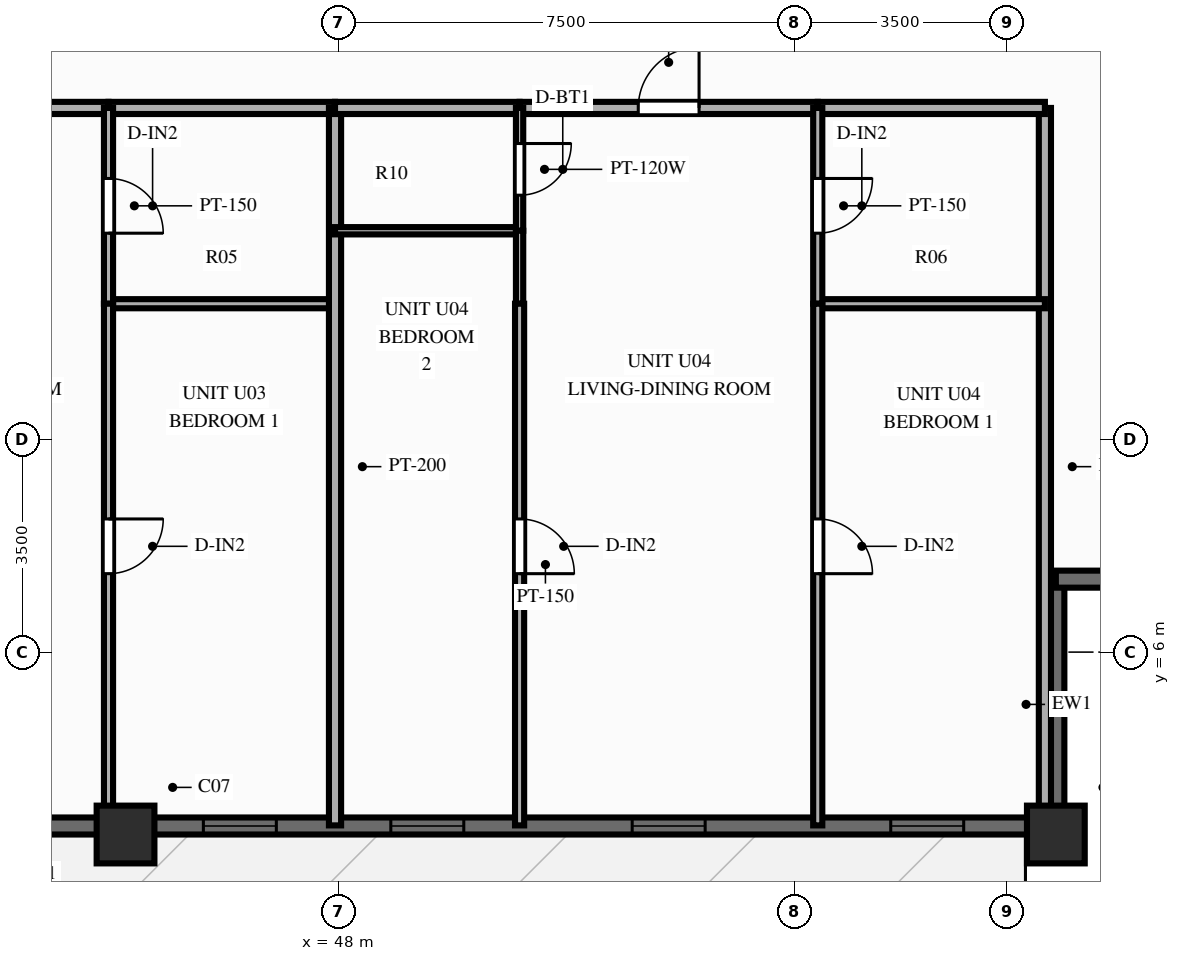
"""IFC4 building model, lengths in metres.
Left out: names, types, materials, properties, quantities, classifications, styles, units other than length and angle.
Written with IfcOpenShell. Run it as: python <this file> out.ifc"""

import sys

from ifc_helpers import new_model, si_unit, direction, frame, frame_2d, origin, origin_2d, place, context, subcontext, project, spatial, rectangle, extrude, source, transform, mapped, element, fill, save


model = new_model("IFC4")
c1 = context("Model", 3, precision=1e-05, world=origin(), true_north=direction((0.0, 1.0)))
c2 = subcontext(c1, "Body", "Model", "MODEL_VIEW")
j1 = project(units=[si_unit("LENGTHUNIT", "METRE"), si_unit("PLANEANGLEUNIT", "RADIAN")], contexts=[c1])
p1 = place(None, origin())
s1 = spatial("IfcSite", under=j1, at=p1, CompositionType="ELEMENT")
p2 = place(p1, origin())
s2 = spatial("IfcBuilding", under=s1, at=p2, CompositionType="ELEMENT")
p3 = place(p2, frame((0.0, 0.0, 86.85)))
s3 = spatial("IfcBuildingStorey", under=s2, at=p3, CompositionType="ELEMENT", Elevation=86.85)
m1 = source(origin(), c2, "Body", "SweptSolid", [
    extrude(rectangle(XDim=0.95, YDim=0.95, at=origin_2d()), origin(), (0.0, 0.0, 1.0), 3.0),
])
for number, where, z_axis, x_axis in (
    (1, (44.5, 3.0, 0.0), (0.0, 0.0, 1.0), (1.0, 0.0, 0.0)),
    (2, (59.8, 3.0, 0.0), (0.0, 0.0, 1.0), (1.0, 0.0, 0.0)),
):
    element("IfcColumn", number, at=place(p3, frame(where, z_axis=z_axis, x_axis=x_axis)), inside=s3, PredefinedType="COLUMN", context=c2, shape_type="MappedRepresentation", body=[
        mapped(m1, transform((0.0, 0.0, 0.0), scale=1.0)),
    ])
p4 = place(p3, frame((16.2, 3.14, 0.0), z_axis=(0.0, 0.0, 1.0), x_axis=(1.0, 0.0, 0.0)))
e3 = element("IfcWall", 3, at=p4, inside=s3, PredefinedType="SOLIDWALL", context=c2, shape_type="SweptSolid", body=[
    extrude(rectangle(XDim=43.6, YDim=0.28, at=frame_2d((21.8, 0.0))), origin(), (0.0, 0.0, 1.0), 2.28),
])
p5 = place(p4, frame((1.022, 0.0, 0.25)))
e4 = element("IfcOpeningElement", 4, at=p5, cuts=e3, PredefinedType="OPENING", context=c2, shape_type="SweptSolid", body=[
    extrude(rectangle(XDim=1.2, YDim=1.5, at=frame_2d((0.6, 0.75))), frame((0.0, 0.152, 0.0), z_axis=(0.0, -1.0, 0.0), x_axis=(1.0, 0.0, 0.0)), (0.0, 0.0, 1.0), 0.304),
])
p6 = place(p4, frame((4.038, 0.0, 0.25)))
e5 = element("IfcOpeningElement", 5, at=p6, cuts=e3, PredefinedType="OPENING", context=c2, shape_type="SweptSolid", body=[
    extrude(rectangle(XDim=1.2, YDim=1.5, at=frame_2d((0.6, 0.75))), frame((0.0, 0.152, 0.0), z_axis=(0.0, -1.0, 0.0), x_axis=(1.0, 0.0, 0.0)), (0.0, 0.0, 1.0), 0.304),
])
p7 = place(p4, frame((7.635, 0.0, 0.25)))
e6 = element("IfcOpeningElement", 6, at=p7, cuts=e3, PredefinedType="OPENING", context=c2, shape_type="SweptSolid", body=[
    extrude(rectangle(XDim=1.2, YDim=1.5, at=frame_2d((0.6, 0.75))), frame((0.0, 0.152, 0.0), z_axis=(0.0, -1.0, 0.0), x_axis=(1.0, 0.0, 0.0)), (0.0, 0.0, 1.0), 0.304),
])
p8 = place(p4, frame((10.9, 0.0, 0.25)))
e7 = element("IfcOpeningElement", 7, at=p8, cuts=e3, PredefinedType="OPENING", context=c2, shape_type="SweptSolid", body=[
    extrude(rectangle(XDim=1.2, YDim=1.5, at=frame_2d((0.6, 0.75))), frame((0.0, 0.152, 0.0), z_axis=(0.0, -1.0, 0.0), x_axis=(1.0, 0.0, 0.0)), (0.0, 0.0, 1.0), 0.304),
])
p9 = place(p4, frame((13.33, 0.0, 0.25)))
e8 = element("IfcOpeningElement", 8, at=p9, cuts=e3, PredefinedType="OPENING", context=c2, shape_type="SweptSolid", body=[
    extrude(rectangle(XDim=1.2, YDim=1.5, at=frame_2d((0.6, 0.75))), frame((0.0, 0.152, 0.0), z_axis=(0.0, -1.0, 0.0), x_axis=(1.0, 0.0, 0.0)), (0.0, 0.0, 1.0), 0.304),
])
p10 = place(p4, frame((17.581, 0.0, 0.25)))
e9 = element("IfcOpeningElement", 9, at=p10, cuts=e3, PredefinedType="OPENING", context=c2, shape_type="SweptSolid", body=[
    extrude(rectangle(XDim=1.2, YDim=1.5, at=frame_2d((0.6, 0.75))), frame((0.0, 0.152, 0.0), z_axis=(0.0, -1.0, 0.0), x_axis=(1.0, 0.0, 0.0)), (0.0, 0.0, 1.0), 0.304),
])
p11 = place(p4, frame((20.988, 0.0, 0.25)))
e10 = element("IfcOpeningElement", 10, at=p11, cuts=e3, PredefinedType="OPENING", context=c2, shape_type="SweptSolid", body=[
    extrude(rectangle(XDim=1.2, YDim=1.5, at=frame_2d((0.6, 0.75))), frame((0.0, 0.152, 0.0), z_axis=(0.0, -1.0, 0.0), x_axis=(1.0, 0.0, 0.0)), (0.0, 0.0, 1.0), 0.304),
])
p12 = place(p4, frame((26.095, 0.0, 0.0), z_axis=(0.0, 0.0, 1.0), x_axis=(-1.0, 0.0, 0.0)))
e11 = element("IfcOpeningElement", 11, at=p12, cuts=e3, PredefinedType="OPENING", context=c2, shape_type="SweptSolid", body=[
    extrude(rectangle(XDim=1.1, YDim=2.15, at=frame_2d((0.55, 1.075))), frame((0.0, 0.152, 0.0), z_axis=(0.0, -1.0, 0.0), x_axis=(1.0, 0.0, 0.0)), (0.0, 0.0, 1.0), 0.304),
])
p13 = place(p4, frame((29.58, 0.0, 0.25)))
e12 = element("IfcOpeningElement", 12, at=p13, cuts=e3, PredefinedType="OPENING", context=c2, shape_type="SweptSolid", body=[
    extrude(rectangle(XDim=1.2, YDim=1.5, at=frame_2d((0.6, 0.75))), frame((0.0, 0.152, 0.0), z_axis=(0.0, -1.0, 0.0), x_axis=(1.0, 0.0, 0.0)), (0.0, 0.0, 1.0), 0.304),
])
p14 = place(p4, frame((32.663, 0.0, 0.25)))
e13 = element("IfcOpeningElement", 13, at=p14, cuts=e3, PredefinedType="OPENING", context=c2, shape_type="SweptSolid", body=[
    extrude(rectangle(XDim=1.2, YDim=1.5, at=frame_2d((0.6, 0.75))), frame((0.0, 0.152, 0.0), z_axis=(0.0, -1.0, 0.0), x_axis=(1.0, 0.0, 0.0)), (0.0, 0.0, 1.0), 0.304),
])
p15 = place(p4, frame((36.632, 0.0, 0.25)))
e14 = element("IfcOpeningElement", 14, at=p15, cuts=e3, PredefinedType="OPENING", context=c2, shape_type="SweptSolid", body=[
    extrude(rectangle(XDim=1.2, YDim=1.5, at=frame_2d((0.6, 0.75))), frame((0.0, 0.152, 0.0), z_axis=(0.0, -1.0, 0.0), x_axis=(1.0, 0.0, 0.0)), (0.0, 0.0, 1.0), 0.304),
])
p16 = place(p4, frame((40.885, 0.0, 0.25)))
e15 = element("IfcOpeningElement", 15, at=p16, cuts=e3, PredefinedType="OPENING", context=c2, shape_type="SweptSolid", body=[
    extrude(rectangle(XDim=1.2, YDim=1.5, at=frame_2d((0.6, 0.75))), frame((0.0, 0.152, 0.0), z_axis=(0.0, -1.0, 0.0), x_axis=(1.0, 0.0, 0.0)), (0.0, 0.0, 1.0), 0.304),
])
for number, where, z_axis, x_axis in (
    (16, (59.8, 3.08, 0.0), (0.0, 0.0, 1.0), (0.0, 1.0, 0.0)),
    (17, (59.8, 7.2, 0.0), (0.0, 0.0, 1.0), (1.0, 0.0, 0.0)),
):
    element("IfcWall", number, at=place(p3, frame(where, z_axis=z_axis, x_axis=x_axis)), inside=s3, PredefinedType="SOLIDWALL", context=c2, shape_type="SweptSolid", body=[
        extrude(rectangle(XDim=4.12, YDim=0.28, at=frame_2d((2.06, 0.0))), origin(), (0.0, 0.0, 1.0), 2.28),
    ])
p17 = place(p3, frame((59.62, 14.95, 0.0), z_axis=(0.0, 0.0, 1.0), x_axis=(0.0, -1.0, 0.0)))
e18 = element("IfcWall", 18, at=p17, inside=s3, PredefinedType="PARTITIONING", context=c2, shape_type="SweptSolid", body=[
    extrude(rectangle(XDim=11.8, YDim=0.2, at=frame_2d((5.9, 0.0))), origin(), (0.0, 0.0, 1.0), 2.79),
])
p18 = place(p3, frame((39.306, 14.95, 0.0), z_axis=(0.0, 0.0, 1.0), x_axis=(1.0, 0.0, 0.0)))
e19 = element("IfcWall", 19, at=p18, inside=s3, PredefinedType="PARTITIONING", context=c2, shape_type="SweptSolid", body=[
    extrude(rectangle(XDim=4.914, YDim=0.2, at=frame_2d((2.457, 0.0))), origin(), (0.0, 0.0, 1.0), 2.79),
])
p19 = place(p18, frame((1.957, 0.0, 0.0)))
e20 = element("IfcOpeningElement", 20, at=p19, cuts=e19, PredefinedType="OPENING", context=c2, shape_type="SweptSolid", body=[
    extrude(rectangle(XDim=1.0, YDim=2.15, at=frame_2d((0.5, 1.075))), frame((0.0, 0.112, 0.0), z_axis=(0.0, -1.0, 0.0), x_axis=(1.0, 0.0, 0.0)), (0.0, 0.0, 1.0), 0.224),
])
p20 = place(p3, frame((44.22, 14.95, 0.0), z_axis=(0.0, 0.0, 1.0), x_axis=(1.0, 0.0, 0.0)))
e21 = element("IfcWall", 21, at=p20, inside=s3, PredefinedType="PARTITIONING", context=c2, shape_type="SweptSolid", body=[
    extrude(rectangle(XDim=3.725, YDim=0.2, at=frame_2d((1.863, 0.0))), origin(), (0.0, 0.0, 1.0), 2.79),
])
p21 = place(p3, frame((44.22, 11.73, 0.0), z_axis=(0.0, 0.0, 1.0), x_axis=(1.0, 0.0, 0.0)))
e22 = element("IfcWall", 22, at=p21, inside=s3, PredefinedType="PARTITIONING", context=c2, shape_type="SweptSolid", body=[
    extrude(rectangle(XDim=3.725, YDim=0.15, at=frame_2d((1.863, 0.0))), origin(), (0.0, 0.0, 1.0), 2.79),
])
p22 = place(p3, frame((44.22, 14.95, 0.0), z_axis=(0.0, 0.0, 1.0), x_axis=(0.0, -1.0, 0.0)))
e23 = element("IfcWall", 23, at=p22, inside=s3, PredefinedType="PARTITIONING", context=c2, shape_type="SweptSolid", body=[
    extrude(rectangle(XDim=3.22, YDim=0.15, at=frame_2d((1.61, 0.0))), origin(), (0.0, 0.0, 1.0), 2.79),
])
p23 = place(p22, frame((1.16, 0.0, 0.0)))
e24 = element("IfcOpeningElement", 24, at=p23, cuts=e23, PredefinedType="OPENING", context=c2, shape_type="SweptSolid", body=[
    extrude(rectangle(XDim=0.9, YDim=2.1, at=frame_2d((0.45, 1.05))), frame((0.0, 0.087, 0.0), z_axis=(0.0, -1.0, 0.0), x_axis=(1.0, 0.0, 0.0)), (0.0, 0.0, 1.0), 0.174),
])
p24 = place(p3, frame((44.22, 11.73, 0.0), z_axis=(0.0, 0.0, 1.0), x_axis=(0.0, -1.0, 0.0)))
e25 = element("IfcWall", 25, at=p24, inside=s3, PredefinedType="PARTITIONING", context=c2, shape_type="SweptSolid", body=[
    extrude(rectangle(XDim=8.58, YDim=0.15, at=frame_2d((4.29, 0.0))), origin(), (0.0, 0.0, 1.0), 2.79),
])
p25 = place(p24, frame((3.54, 0.0, 0.0)))
e26 = element("IfcOpeningElement", 26, at=p25, cuts=e25, PredefinedType="OPENING", context=c2, shape_type="SweptSolid", body=[
    extrude(rectangle(XDim=0.9, YDim=2.1, at=frame_2d((0.45, 1.05))), frame((0.0, 0.087, 0.0), z_axis=(0.0, -1.0, 0.0), x_axis=(1.0, 0.0, 0.0)), (0.0, 0.0, 1.0), 0.174),
])
p26 = place(p3, frame((47.945, 14.95, 0.0), z_axis=(0.0, 0.0, 1.0), x_axis=(0.0, -1.0, 0.0)))
e27 = element("IfcWall", 27, at=p26, inside=s3, PredefinedType="PARTITIONING", context=c2, shape_type="SweptSolid", body=[
    extrude(rectangle(XDim=11.8, YDim=0.2, at=frame_2d((5.9, 0.0))), origin(), (0.0, 0.0, 1.0), 2.79),
])
p27 = place(p3, frame((47.945, 14.95, 0.0), z_axis=(0.0, 0.0, 1.0), x_axis=(1.0, 0.0, 0.0)))
e28 = element("IfcWall", 28, at=p27, inside=s3, PredefinedType="PARTITIONING", context=c2, shape_type="SweptSolid", body=[
    extrude(rectangle(XDim=3.035, YDim=0.2, at=frame_2d((1.518, 0.0))), origin(), (0.0, 0.0, 1.0), 2.79),
])
p28 = place(p3, frame((50.981, 14.95, 0.0), z_axis=(0.0, 0.0, 1.0), x_axis=(1.0, 0.0, 0.0)))
e29 = element("IfcWall", 29, at=p28, inside=s3, PredefinedType="PARTITIONING", context=c2, shape_type="SweptSolid", body=[
    extrude(rectangle(XDim=4.903, YDim=0.2, at=frame_2d((2.452, 0.0))), origin(), (0.0, 0.0, 1.0), 2.79),
])
p29 = place(p28, frame((1.952, 0.0, 0.0)))
e30 = element("IfcOpeningElement", 30, at=p29, cuts=e29, PredefinedType="OPENING", context=c2, shape_type="SweptSolid", body=[
    extrude(rectangle(XDim=1.0, YDim=2.15, at=frame_2d((0.5, 1.075))), frame((0.0, 0.112, 0.0), z_axis=(0.0, -1.0, 0.0), x_axis=(1.0, 0.0, 0.0)), (0.0, 0.0, 1.0), 0.224),
])
p30 = place(p3, frame((55.884, 14.95, 0.0), z_axis=(0.0, 0.0, 1.0), x_axis=(1.0, 0.0, 0.0)))
e31 = element("IfcWall", 31, at=p30, inside=s3, PredefinedType="PARTITIONING", context=c2, shape_type="SweptSolid", body=[
    extrude(rectangle(XDim=3.736, YDim=0.2, at=frame_2d((1.868, 0.0))), origin(), (0.0, 0.0, 1.0), 2.79),
])
p31 = place(p3, frame((47.945, 12.93, 0.0), z_axis=(0.0, 0.0, 1.0), x_axis=(1.0, 0.0, 0.0)))
e32 = element("IfcWall", 32, at=p31, inside=s3, PredefinedType="PARTITIONING", context=c2, shape_type="SweptSolid", body=[
    extrude(rectangle(XDim=3.035, YDim=0.12, at=frame_2d((1.518, 0.0))), origin(), (0.0, 0.0, 1.0), 2.79),
])
p32 = place(p3, frame((55.884, 11.73, 0.0), z_axis=(0.0, 0.0, 1.0), x_axis=(1.0, 0.0, 0.0)))
e33 = element("IfcWall", 33, at=p32, inside=s3, PredefinedType="PARTITIONING", context=c2, shape_type="SweptSolid", body=[
    extrude(rectangle(XDim=3.736, YDim=0.15, at=frame_2d((1.868, 0.0))), origin(), (0.0, 0.0, 1.0), 2.79),
])
p33 = place(p3, frame((50.981, 14.95, 0.0), z_axis=(0.0, 0.0, 1.0), x_axis=(0.0, -1.0, 0.0)))
e34 = element("IfcWall", 34, at=p33, inside=s3, PredefinedType="PARTITIONING", context=c2, shape_type="SweptSolid", body=[
    extrude(rectangle(XDim=2.02, YDim=0.12, at=frame_2d((1.01, 0.0))), origin(), (0.0, 0.0, 1.0), 2.79),
])
p34 = place(p33, frame((0.585, 0.0, 0.0)))
e35 = element("IfcOpeningElement", 35, at=p34, cuts=e34, PredefinedType="OPENING", context=c2, shape_type="SweptSolid", body=[
    extrude(rectangle(XDim=0.85, YDim=2.05, at=frame_2d((0.425, 1.025))), frame((0.0, 0.072, 0.0), z_axis=(0.0, -1.0, 0.0), x_axis=(1.0, 0.0, 0.0)), (0.0, 0.0, 1.0), 0.144),
])
p35 = place(p3, frame((50.981, 12.93, 0.0), z_axis=(0.0, 0.0, 1.0), x_axis=(0.0, -1.0, 0.0)))
e36 = element("IfcWall", 36, at=p35, inside=s3, PredefinedType="PARTITIONING", context=c2, shape_type="SweptSolid", body=[
    extrude(rectangle(XDim=1.2, YDim=0.12, at=frame_2d((0.6, 0.0))), origin(), (0.0, 0.0, 1.0), 2.79),
])
p36 = place(p3, frame((50.981, 11.73, 0.0), z_axis=(0.0, 0.0, 1.0), x_axis=(0.0, -1.0, 0.0)))
e37 = element("IfcWall", 37, at=p36, inside=s3, PredefinedType="PARTITIONING", context=c2, shape_type="SweptSolid", body=[
    extrude(rectangle(XDim=8.58, YDim=0.15, at=frame_2d((4.29, 0.0))), origin(), (0.0, 0.0, 1.0), 2.79),
])
p37 = place(p36, frame((3.54, 0.0, 0.0)))
e38 = element("IfcOpeningElement", 38, at=p37, cuts=e37, PredefinedType="OPENING", context=c2, shape_type="SweptSolid", body=[
    extrude(rectangle(XDim=0.9, YDim=2.1, at=frame_2d((0.45, 1.05))), frame((0.0, 0.087, 0.0), z_axis=(0.0, -1.0, 0.0), x_axis=(1.0, 0.0, 0.0)), (0.0, 0.0, 1.0), 0.174),
])
p38 = place(p3, frame((55.884, 14.95, 0.0), z_axis=(0.0, 0.0, 1.0), x_axis=(0.0, -1.0, 0.0)))
e39 = element("IfcWall", 39, at=p38, inside=s3, PredefinedType="PARTITIONING", context=c2, shape_type="SweptSolid", body=[
    extrude(rectangle(XDim=3.22, YDim=0.15, at=frame_2d((1.61, 0.0))), origin(), (0.0, 0.0, 1.0), 2.79),
])
p39 = place(p38, frame((1.16, 0.0, 0.0)))
e40 = element("IfcOpeningElement", 40, at=p39, cuts=e39, PredefinedType="OPENING", context=c2, shape_type="SweptSolid", body=[
    extrude(rectangle(XDim=0.9, YDim=2.1, at=frame_2d((0.45, 1.05))), frame((0.0, 0.087, 0.0), z_axis=(0.0, -1.0, 0.0), x_axis=(1.0, 0.0, 0.0)), (0.0, 0.0, 1.0), 0.174),
])
p40 = place(p3, frame((55.884, 11.73, 0.0), z_axis=(0.0, 0.0, 1.0), x_axis=(0.0, -1.0, 0.0)))
e41 = element("IfcWall", 41, at=p40, inside=s3, PredefinedType="PARTITIONING", context=c2, shape_type="SweptSolid", body=[
    extrude(rectangle(XDim=8.58, YDim=0.15, at=frame_2d((4.29, 0.0))), origin(), (0.0, 0.0, 1.0), 2.79),
])
p41 = place(p40, frame((3.54, 0.0, 0.0)))
e42 = element("IfcOpeningElement", 42, at=p41, cuts=e41, PredefinedType="OPENING", context=c2, shape_type="SweptSolid", body=[
    extrude(rectangle(XDim=0.9, YDim=2.1, at=frame_2d((0.45, 1.05))), frame((0.0, 0.087, 0.0), z_axis=(0.0, -1.0, 0.0), x_axis=(1.0, 0.0, 0.0)), (0.0, 0.0, 1.0), 0.174),
])
m2 = source(origin(), c2, "Body", "SweptSolid", [
    extrude(rectangle(XDim=1.2, YDim=1.5, at=frame_2d((0.6, 0.75))), frame((0.0, 0.03, 0.0), z_axis=(0.0, -1.0, 0.0), x_axis=(1.0, 0.0, 0.0)), (0.0, 0.0, 1.0), 0.06),
])
p42 = place(p13, origin())
e43 = element("IfcWindow", 43, at=p42, inside=s3, PartitioningType="SINGLE_PANEL", PredefinedType="WINDOW", context=c2, shape_type="MappedRepresentation", body=[
    mapped(m2, transform((0.0, 0.0, 0.0), scale=1.0)),
])
fill(e12, e43)
p43 = place(p14, origin())
e44 = element("IfcWindow", 44, at=p43, inside=s3, PartitioningType="SINGLE_PANEL", PredefinedType="WINDOW", context=c2, shape_type="MappedRepresentation", body=[
    mapped(m2, transform((0.0, 0.0, 0.0), scale=1.0)),
])
fill(e13, e44)
p44 = place(p15, origin())
e45 = element("IfcWindow", 45, at=p44, inside=s3, PartitioningType="SINGLE_PANEL", PredefinedType="WINDOW", context=c2, shape_type="MappedRepresentation", body=[
    mapped(m2, transform((0.0, 0.0, 0.0), scale=1.0)),
])
fill(e14, e45)
p45 = place(p16, origin())
e46 = element("IfcWindow", 46, at=p45, inside=s3, PartitioningType="SINGLE_PANEL", PredefinedType="WINDOW", context=c2, shape_type="MappedRepresentation", body=[
    mapped(m2, transform((0.0, 0.0, 0.0), scale=1.0)),
])
fill(e15, e46)
m3 = source(origin(), c2, "Body", "SweptSolid", [
    extrude(rectangle(XDim=0.9, YDim=2.1, at=frame_2d((0.45, 1.05))), frame((0.0, 0.025, 0.0), z_axis=(0.0, -1.0, 0.0), x_axis=(1.0, 0.0, 0.0)), (0.0, 0.0, 1.0), 0.05),
])
p46 = place(p23, origin())
e47 = element("IfcDoor", 47, at=p46, inside=s3, OperationType="SINGLE_SWING_RIGHT", PredefinedType="DOOR", context=c2, shape_type="MappedRepresentation", body=[
    mapped(m3, transform((0.0, 0.0, 0.0), scale=1.0)),
])
fill(e24, e47)
p47 = place(p25, origin())
e48 = element("IfcDoor", 48, at=p47, inside=s3, OperationType="SINGLE_SWING_LEFT", PredefinedType="DOOR", context=c2, shape_type="MappedRepresentation", body=[
    mapped(m3, transform((0.0, 0.0, 0.0), scale=1.0)),
])
fill(e26, e48)
m4 = source(origin(), c2, "Body", "SweptSolid", [
    extrude(rectangle(XDim=1.0, YDim=2.15, at=frame_2d((0.5, 1.075))), frame((0.0, 0.025, 0.0), z_axis=(0.0, -1.0, 0.0), x_axis=(1.0, 0.0, 0.0)), (0.0, 0.0, 1.0), 0.05),
])
p48 = place(p29, origin())
e49 = element("IfcDoor", 49, at=p48, inside=s3, OperationType="SINGLE_SWING_RIGHT", PredefinedType="DOOR", context=c2, shape_type="MappedRepresentation", body=[
    mapped(m4, transform((0.0, 0.0, 0.0), scale=1.0)),
])
fill(e30, e49)
m5 = source(origin(), c2, "Body", "SweptSolid", [
    extrude(rectangle(XDim=0.85, YDim=2.05, at=frame_2d((0.425, 1.025))), frame((0.0, 0.025, 0.0), z_axis=(0.0, -1.0, 0.0), x_axis=(1.0, 0.0, 0.0)), (0.0, 0.0, 1.0), 0.05),
])
p49 = place(p34, origin())
e50 = element("IfcDoor", 50, at=p49, inside=s3, OperationType="SINGLE_SWING_LEFT", PredefinedType="DOOR", context=c2, shape_type="MappedRepresentation", body=[
    mapped(m5, transform((0.0, 0.0, 0.0), scale=1.0)),
])
fill(e35, e50)
p50 = place(p37, origin())
e51 = element("IfcDoor", 51, at=p50, inside=s3, OperationType="SINGLE_SWING_RIGHT", PredefinedType="DOOR", context=c2, shape_type="MappedRepresentation", body=[
    mapped(m3, transform((0.0, 0.0, 0.0), scale=1.0)),
])
fill(e38, e51)
p51 = place(p39, origin())
e52 = element("IfcDoor", 52, at=p51, inside=s3, OperationType="SINGLE_SWING_LEFT", PredefinedType="DOOR", context=c2, shape_type="MappedRepresentation", body=[
    mapped(m3, transform((0.0, 0.0, 0.0), scale=1.0)),
])
fill(e40, e52)
p52 = place(p41, origin())
e53 = element("IfcDoor", 53, at=p52, inside=s3, OperationType="SINGLE_SWING_RIGHT", PredefinedType="DOOR", context=c2, shape_type="MappedRepresentation", body=[
    mapped(m3, transform((0.0, 0.0, 0.0), scale=1.0)),
])
fill(e42, e53)
save(model, sys.argv[1])
